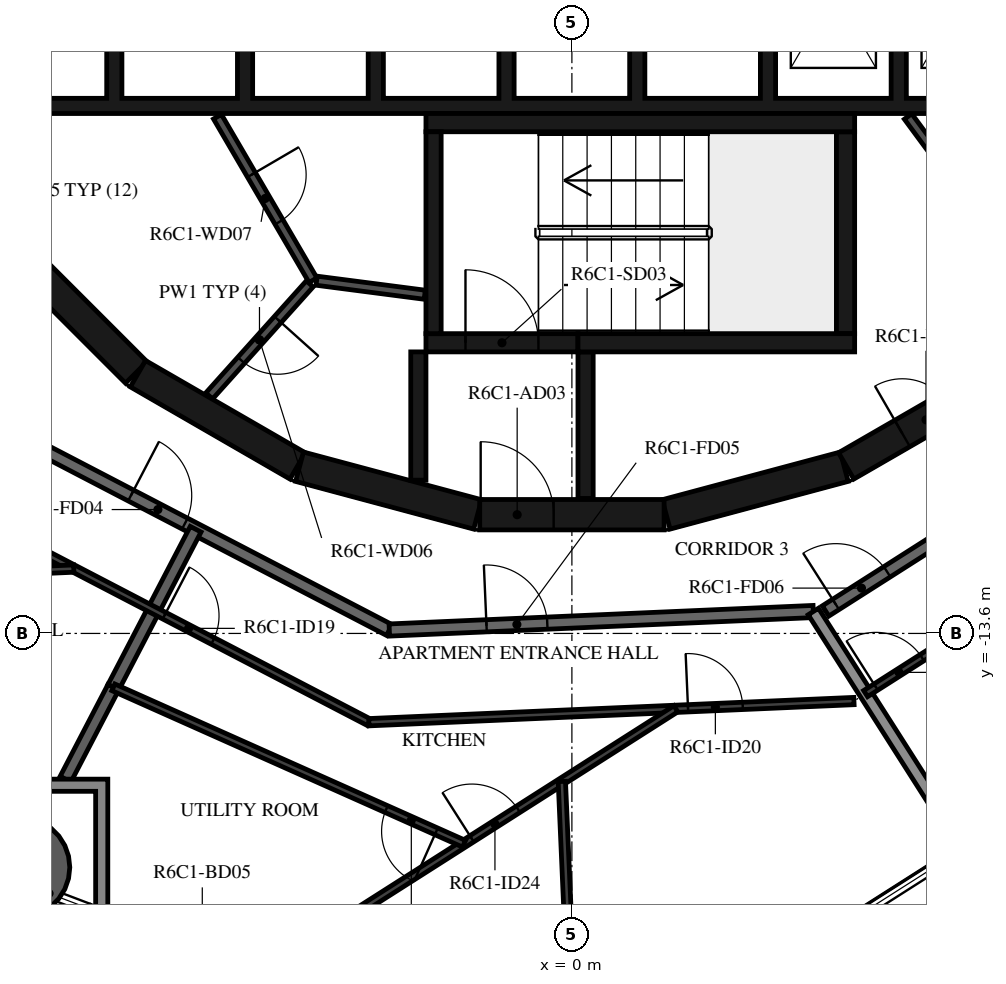
"""IFC4 building model, lengths in metres.
Left out: names, types, materials, properties, quantities, classifications, styles, units other than length and angle.
Written with IfcOpenShell. Run it as: python <this file> out.ifc"""

import sys

from ifc_helpers import new_model, si_unit, direction, frame, frame_2d, origin, origin_2d, place, context, subcontext, project, spatial, polyline, rectangle, hollow_circle, outline, extrude, element, fill, save


model = new_model("IFC4")
c1 = context("Model", 3, precision=1e-05, world=origin(), true_north=direction((0.0, 1.0)))
c2 = subcontext(c1, "Body", "Model", "MODEL_VIEW")
j1 = project(units=[si_unit("LENGTHUNIT", "METRE"), si_unit("PLANEANGLEUNIT", "RADIAN")], contexts=[c1])
p1 = place(None, origin())
s1 = spatial("IfcSite", under=j1, at=p1, CompositionType="ELEMENT")
p2 = place(p1, origin())
s2 = spatial("IfcBuilding", under=s1, at=p2, CompositionType="ELEMENT")
p3 = place(p2, frame((0.0, 0.0, 251.2)))
s3 = spatial("IfcBuildingStorey", under=s2, at=p3, CompositionType="ELEMENT", Elevation=251.2)
p4 = place(p3, frame((-9.082, -17.446, -0.38), z_axis=(0.0, 0.0, 1.0), x_axis=(1.0, 0.0, 0.0)))
e1 = element("IfcColumn", 1, at=p4, inside=s3, PredefinedType="COLUMN", context=c2, shape_type="SweptSolid", body=[
    extrude(hollow_circle(Radius=0.825, WallThickness=0.04, at=origin_2d()), origin(), (0.0, 0.0, 1.0), 3.5),
])
p5 = place(p3, frame((1.55, -11.643, 0.0), z_axis=(0.0, 0.0, 1.0), x_axis=(0.965948410781, 0.258734743916, 0.0)))
e2 = element("IfcWall", 2, at=p5, inside=s3, PredefinedType="SHEAR", context=c2, shape_type="SweptSolid", body=[
    extrude(rectangle(XDim=3.033, YDim=0.5, at=frame_2d((1.516, 0.0))), origin(), (0.0, 0.0, 1.0), 3.12),
])
p6 = place(p3, frame((4.51, -10.845, 0.0), z_axis=(0.0, 0.0, 1.0), x_axis=(0.865975092491, 0.500087131594, 0.0)))
e3 = element("IfcWall", 3, at=p6, inside=s3, PredefinedType="SHEAR", context=c2, shape_type="SweptSolid", body=[
    extrude(rectangle(XDim=3.033, YDim=0.5, at=frame_2d((1.516, 0.0))), origin(), (0.0, 0.0, 1.0), 3.12),
])
p7 = place(p6, frame((1.066, 0.0, 0.0)))
e4 = element("IfcOpeningElement", 4, at=p7, cuts=e3, PredefinedType="OPENING", context=c2, shape_type="SweptSolid", body=[
    extrude(rectangle(XDim=0.9, YDim=2.1, at=frame_2d((0.45, 1.05))), frame((0.0, 0.26, 0.0), z_axis=(0.0, -1.0, 0.0), x_axis=(1.0, 0.0, 0.0)), (0.0, 0.0, 1.0), 0.52),
])
p8 = place(p3, frame((-9.308, -7.164, 0.0), z_axis=(0.0, 0.0, 1.0), x_axis=(0.707106781187, -0.707106781187, 0.0)))
e5 = element("IfcWall", 5, at=p8, inside=s3, PredefinedType="SHEAR", context=c2, shape_type="SweptSolid", body=[
    extrude(rectangle(XDim=3.032, YDim=0.5, at=frame_2d((1.516, 0.0))), origin(), (0.0, 0.0, 1.0), 3.12),
])
for number, where, z_axis, x_axis in (
    (6, (-7.137, -9.329, 0.0), (0.0, 0.0, 1.0), (0.866, -0.5, 0.0)),
    (7, (-4.479, -10.858, 0.0), (0.0, 0.0, 1.0), (0.966, -0.259, 0.0)),
):
    element("IfcWall", number, at=place(p3, frame(where, z_axis=z_axis, x_axis=x_axis)), inside=s3, PredefinedType="SHEAR", context=c2, shape_type="SweptSolid", body=[
        extrude(rectangle(XDim=3.033, YDim=0.5, at=frame_2d((1.516, 0.0))), origin(), (0.0, 0.0, 1.0), 3.12),
    ])
p9 = place(p3, frame((-1.516, -11.647, 0.0), z_axis=(0.0, 0.0, 1.0), x_axis=(1.0, 0.0, 0.0)))
e8 = element("IfcWall", 8, at=p9, inside=s3, PredefinedType="SHEAR", context=c2, shape_type="SweptSolid", body=[
    extrude(rectangle(XDim=3.033, YDim=0.5, at=frame_2d((1.516, 0.0))), origin(), (0.0, 0.0, 1.0), 3.12),
])
p10 = place(p9, frame((0.016, 0.0, 0.0)))
e9 = element("IfcOpeningElement", 9, at=p10, cuts=e8, PredefinedType="OPENING", context=c2, shape_type="SweptSolid", body=[
    extrude(rectangle(XDim=1.2, YDim=2.1, at=frame_2d((0.6, 1.05))), frame((0.0, 0.26, 0.0), z_axis=(0.0, -1.0, 0.0), x_axis=(1.0, 0.0, 0.0)), (0.0, 0.0, 1.0), 0.52),
])
p11 = place(p3, frame((-2.275, -8.67, 0.0), z_axis=(0.0, 0.0, 1.0), x_axis=(0.0, 1.0, 0.0)))
e10 = element("IfcWall", 10, at=p11, inside=s3, PredefinedType="SHEAR", context=c2, shape_type="SweptSolid", body=[
    extrude(rectangle(XDim=3.32, YDim=0.25, at=frame_2d((1.66, 0.0))), origin(), (0.0, 0.0, 1.0), 3.12),
])
p12 = place(p3, frame((-2.4, -5.2, 0.0), z_axis=(0.0, 0.0, 1.0), x_axis=(1.0, 0.0, 0.0)))
e11 = element("IfcWall", 11, at=p12, inside=s3, PredefinedType="SHEAR", context=c2, shape_type="SweptSolid", body=[
    extrude(rectangle(XDim=7.05, YDim=0.3, at=frame_2d((3.525, 0.0))), origin(), (0.0, 0.0, 1.0), 3.12),
])
p13 = place(p3, frame((4.5, -8.67, 0.0), z_axis=(0.0, 0.0, 1.0), x_axis=(0.0, 1.0, 0.0)))
e12 = element("IfcWall", 12, at=p13, inside=s3, PredefinedType="SHEAR", context=c2, shape_type="SweptSolid", body=[
    extrude(rectangle(XDim=3.32, YDim=0.3, at=frame_2d((1.66, 0.0))), origin(), (0.0, 0.0, 1.0), 3.12),
])
p14 = place(p3, frame((0.1, -8.82, 0.0), z_axis=(0.0, 0.0, 1.0), x_axis=(1.0, 0.0, 0.0)))
e13 = element("IfcWall", 13, at=p14, inside=s3, PredefinedType="SHEAR", context=c2, shape_type="SweptSolid", body=[
    extrude(rectangle(XDim=4.55, YDim=0.3, at=frame_2d((2.275, 0.0))), origin(), (0.0, 0.0, 1.0), 3.12),
])
p15 = place(p3, frame((-2.4, -8.82, 0.0), z_axis=(0.0, 0.0, 1.0), x_axis=(1.0, 0.0, 0.0)))
e14 = element("IfcWall", 14, at=p15, inside=s3, PredefinedType="SHEAR", context=c2, shape_type="SweptSolid", body=[
    extrude(rectangle(XDim=2.5, YDim=0.3, at=frame_2d((1.25, 0.0))), origin(), (0.0, 0.0, 1.0), 3.12),
])
p16 = place(p15, frame((0.65, 0.0, 0.0)))
e15 = element("IfcOpeningElement", 15, at=p16, cuts=e14, PredefinedType="OPENING", context=c2, shape_type="SweptSolid", body=[
    extrude(rectangle(XDim=1.2, YDim=2.1, at=frame_2d((0.6, 1.05))), frame((0.0, 0.16, 0.0), z_axis=(0.0, -1.0, 0.0), x_axis=(1.0, 0.0, 0.0)), (0.0, 0.0, 1.0), 0.32),
])
p17 = place(p3, frame((-2.525, -8.97, 0.0), z_axis=(0.0, 0.0, 1.0), x_axis=(0.0, -1.0, 0.0)))
e16 = element("IfcWall", 16, at=p17, inside=s3, PredefinedType="SHEAR", context=c2, shape_type="SweptSolid", body=[
    extrude(rectangle(XDim=2.11, YDim=0.25, at=frame_2d((1.055, 0.0))), origin(), (0.0, 0.0, 1.0), 3.12),
])
p18 = place(p3, frame((0.225, -8.97, 0.0), z_axis=(0.0, 0.0, 1.0), x_axis=(0.0, -1.0, 0.0)))
e17 = element("IfcWall", 17, at=p18, inside=s3, PredefinedType="SHEAR", context=c2, shape_type="SweptSolid", body=[
    extrude(rectangle(XDim=2.41, YDim=0.25, at=frame_2d((1.205, 0.0))), origin(), (0.0, 0.0, 1.0), 3.12),
])
p19 = place(p3, origin())
e18 = element("IfcWall", 18, at=p19, inside=s3, PredefinedType="SHEAR", context=c2, shape_type="SweptSolid", body=[
    extrude(outline(polyline([(9.8, -5.05), (9.8, -4.8), (9.8, -1.9), (9.55, -1.9), (9.55, -4.8), (7.65, -4.8), (7.65, -1.9), (7.4, -1.9), (7.4, -4.8), (5.5, -4.8), (5.5, -1.9), (5.25, -1.9), (5.25, -4.8), (3.35, -4.8), (3.35, -1.9), (3.1, -1.9), (3.1, -4.8), (1.2, -4.8), (1.2, -1.9), (0.95, -1.9), (0.95, -4.8), (-0.95, -4.8), (-0.95, -1.9), (-1.2, -1.9), (-1.2, -4.8), (-3.1, -4.8), (-3.1, -1.9), (-3.35, -1.9), (-3.35, -4.8), (-5.25, -4.8), (-5.25, -1.9), (-5.5, -1.9), (-5.5, -4.8), (-7.4, -4.8), (-7.4, -1.9), (-7.65, -1.9), (-7.65, -4.8), (-9.55, -4.8), (-9.55, -1.9), (-9.8, -1.9), (-9.8, -4.8), (-9.8, -5.05), (9.8, -5.05)])), origin(), (0.0, 0.0, 1.0), 3.12),
])
p20 = place(p3, frame((5.528, -5.098, 0.0), z_axis=(0.0, 0.0, 1.0), x_axis=(0.594034318069, -0.804439698769, 0.0)))
e19 = element("IfcWall", 19, at=p20, inside=s3, PredefinedType="PARTITIONING", context=c2, shape_type="SweptSolid", body=[
    extrude(rectangle(XDim=3.907, YDim=0.15, at=frame_2d((1.953, 0.0))), origin(), (0.0, 0.0, 1.0), 3.12),
])
p21 = place(p3, frame((-5.829, -5.102, 0.0), z_axis=(0.0, 0.0, 1.0), x_axis=(0.504480008384, -0.863423373057, 0.0)))
e20 = element("IfcWall", 20, at=p21, inside=s3, PredefinedType="PARTITIONING", context=c2, shape_type="SweptSolid", body=[
    extrude(rectangle(XDim=3.115, YDim=0.15, at=frame_2d((1.558, 0.0))), origin(), (0.0, 0.0, 1.0), 3.12),
])
p22 = place(p21, frame((1.107, 0.0, 0.0)))
e21 = element("IfcOpeningElement", 21, at=p22, cuts=e20, PredefinedType="OPENING", context=c2, shape_type="SweptSolid", body=[
    extrude(rectangle(XDim=0.9, YDim=2.1, at=frame_2d((0.45, 1.05))), frame((0.0, 0.085, 0.0), z_axis=(0.0, -1.0, 0.0), x_axis=(1.0, 0.0, 0.0)), (0.0, 0.0, 1.0), 0.17),
])
p23 = place(p3, frame((-4.311, -7.851, 0.0), z_axis=(0.0, 0.0, 1.0), x_axis=(-0.667869133096, -0.744278725383, 0.0)))
e22 = element("IfcWall", 22, at=p23, inside=s3, PredefinedType="PARTITIONING", context=c2, shape_type="SweptSolid", body=[
    extrude(rectangle(XDim=2.476, YDim=0.15, at=frame_2d((1.238, 0.0))), origin(), (0.0, 0.0, 1.0), 3.12),
])
p24 = place(p23, frame((0.788, 0.0, 0.0)))
e23 = element("IfcOpeningElement", 23, at=p24, cuts=e22, PredefinedType="OPENING", context=c2, shape_type="SweptSolid", body=[
    extrude(rectangle(XDim=0.9, YDim=2.1, at=frame_2d((0.45, 1.05))), frame((0.0, 0.085, 0.0), z_axis=(0.0, -1.0, 0.0), x_axis=(1.0, 0.0, 0.0)), (0.0, 0.0, 1.0), 0.17),
])
p25 = place(p3, frame((-4.198, -7.799, 0.0), z_axis=(0.0, 0.0, 1.0), x_axis=(0.991686747293, -0.128675542523, 0.0)))
e24 = element("IfcWall", 24, at=p25, inside=s3, PredefinedType="PARTITIONING", context=c2, shape_type="SweptSolid", body=[
    extrude(rectangle(XDim=1.793, YDim=0.15, at=frame_2d((0.896, 0.0))), origin(), (0.0, 0.0, 1.0), 3.12),
])
p26 = place(p3, frame((-9.372, -10.228, 0.0), z_axis=(0.0, 0.0, 1.0), x_axis=(0.887005184532, -0.461759464021, 0.0)))
e25 = element("IfcWall", 25, at=p26, inside=s3, PredefinedType="STANDARD", context=c2, shape_type="SweptSolid", body=[
    extrude(rectangle(XDim=7.181, YDim=0.2, at=frame_2d((3.591, 0.0))), origin(), (0.0, 0.0, 1.0), 3.12),
])
p27 = place(p26, frame((2.391, 0.0, 0.0)))
e26 = element("IfcOpeningElement", 26, at=p27, cuts=e25, PredefinedType="OPENING", context=c2, shape_type="SweptSolid", body=[
    extrude(rectangle(XDim=1.0, YDim=2.1, at=frame_2d((0.5, 1.05))), frame((0.0, 0.11, 0.0), z_axis=(0.0, -1.0, 0.0), x_axis=(1.0, 0.0, 0.0)), (0.0, 0.0, 1.0), 0.22),
])
p28 = place(p3, frame((-3.003, -13.544, 0.0), z_axis=(0.0, 0.0, 1.0), x_axis=(0.999048221872, 0.043619380718, 0.0)))
e27 = element("IfcWall", 27, at=p28, inside=s3, PredefinedType="STANDARD", context=c2, shape_type="SweptSolid", body=[
    extrude(rectangle(XDim=6.979, YDim=0.2, at=frame_2d((3.49, 0.0))), origin(), (0.0, 0.0, 1.0), 3.12),
])
p29 = place(p28, frame((1.6, 0.0, 0.0)))
e28 = element("IfcOpeningElement", 28, at=p29, cuts=e27, PredefinedType="OPENING", context=c2, shape_type="SweptSolid", body=[
    extrude(rectangle(XDim=1.0, YDim=2.1, at=frame_2d((0.5, 1.05))), frame((0.0, 0.11, 0.0), z_axis=(0.0, -1.0, 0.0), x_axis=(1.0, 0.0, 0.0)), (0.0, 0.0, 1.0), 0.22),
])
p30 = place(p3, frame((4.172, -13.231, 0.0), z_axis=(0.0, 0.0, 1.0), x_axis=(0.843388394728, 0.537304397561, 0.0)))
e29 = element("IfcWall", 29, at=p30, inside=s3, PredefinedType="STANDARD", context=c2, shape_type="SweptSolid", body=[
    extrude(rectangle(XDim=7.181, YDim=0.2, at=frame_2d((3.59, 0.0))), origin(), (0.0, 0.0, 1.0), 3.12),
])
p31 = place(p30, frame((0.2, 0.0, 0.0)))
e30 = element("IfcOpeningElement", 30, at=p31, cuts=e29, PredefinedType="OPENING", context=c2, shape_type="SweptSolid", body=[
    extrude(rectangle(XDim=1.0, YDim=2.1, at=frame_2d((0.5, 1.05))), frame((0.0, 0.11, 0.0), z_axis=(0.0, -1.0, 0.0), x_axis=(1.0, 0.0, 0.0)), (0.0, 0.0, 1.0), 0.22),
])
p32 = place(p3, frame((-7.541, -14.486, 0.0), z_axis=(0.0, 0.0, 1.0), x_axis=(0.461746051786, 0.88701216658, 0.0)))
e31 = element("IfcWall", 31, at=p32, inside=s3, PredefinedType="STANDARD", context=c2, shape_type="SweptSolid", body=[
    extrude(rectangle(XDim=2.931, YDim=0.2, at=frame_2d((1.466, 0.0))), origin(), (0.0, 0.0, 1.0), 3.12),
])
p33 = place(p3, frame((-8.327, -15.996, 0.0), z_axis=(0.0, 0.0, 1.0), x_axis=(0.461722915657, 0.887024210017, 0.0)))
e32 = element("IfcWall", 32, at=p33, inside=s3, PredefinedType="STANDARD", context=c2, shape_type="SweptSolid", body=[
    extrude(rectangle(XDim=1.703, YDim=0.2, at=frame_2d((0.851, 0.0))), origin(), (0.0, 0.0, 1.0), 3.12),
])
p34 = place(p3, frame((6.407, -17.064, 0.0), z_axis=(0.0, 0.0, 1.0), x_axis=(-0.537324777979, 0.843375410461, 0.0)))
e33 = element("IfcWall", 33, at=p34, inside=s3, PredefinedType="STANDARD", context=c2, shape_type="SweptSolid", body=[
    extrude(rectangle(XDim=4.535, YDim=0.2, at=frame_2d((2.268, 0.0))), origin(), (0.0, 0.0, 1.0), 2.73),
])
p35 = place(p3, frame((-10.421, -11.373, 0.0), z_axis=(0.0, 0.0, 1.0), x_axis=(0.887012970857, -0.461744506769, 0.0)))
e34 = element("IfcWall", 34, at=p35, inside=s3, PredefinedType="PARTITIONING", context=c2, shape_type="SweptSolid", body=[
    extrude(rectangle(XDim=7.985, YDim=0.12, at=frame_2d((3.992, 0.0))), origin(), (0.0, 0.0, 1.0), 3.12),
])
p36 = place(p35, frame((4.192, 0.0, 0.0)))
e35 = element("IfcOpeningElement", 35, at=p36, cuts=e34, PredefinedType="OPENING", context=c2, shape_type="SweptSolid", body=[
    extrude(rectangle(XDim=0.9, YDim=2.1, at=frame_2d((0.45, 1.05))), frame((0.0, 0.07, 0.0), z_axis=(0.0, -1.0, 0.0), x_axis=(1.0, 0.0, 0.0)), (0.0, 0.0, 1.0), 0.14),
])
p37 = place(p3, frame((-13.69, -12.774, 0.0), z_axis=(0.0, 0.0, 1.0), x_axis=(0.999048778431, 0.043606631553, 0.0)))
e36 = element("IfcWall", 36, at=p37, inside=s3, PredefinedType="PARTITIONING", context=c2, shape_type="SweptSolid", body=[
    extrude(rectangle(XDim=5.503, YDim=0.12, at=frame_2d((2.752, 0.0))), origin(), (0.0, 0.0, 1.0), 3.12),
])
p38 = place(p37, frame((0.6, 0.0, 0.0)))
e37 = element("IfcOpeningElement", 37, at=p38, cuts=e36, PredefinedType="OPENING", context=c2, shape_type="SweptSolid", body=[
    extrude(rectangle(XDim=0.9, YDim=2.1, at=frame_2d((0.45, 1.05))), frame((0.0, 0.07, 0.0), z_axis=(0.0, -1.0, 0.0), x_axis=(1.0, 0.0, 0.0)), (0.0, 0.0, 1.0), 0.14),
])
p39 = place(p3, frame((-3.339, -15.06, 0.0), z_axis=(0.0, 0.0, 1.0), x_axis=(0.999047716945, 0.043630943905, 0.0)))
e38 = element("IfcWall", 38, at=p39, inside=s3, PredefinedType="PARTITIONING", context=c2, shape_type="SweptSolid", body=[
    extrude(rectangle(XDim=7.985, YDim=0.12, at=frame_2d((3.992, 0.0))), origin(), (0.0, 0.0, 1.0), 3.12),
])
p40 = place(p39, frame((5.253, 0.0, 0.0)))
e39 = element("IfcOpeningElement", 39, at=p40, cuts=e38, PredefinedType="OPENING", context=c2, shape_type="SweptSolid", body=[
    extrude(rectangle(XDim=0.9, YDim=2.1, at=frame_2d((0.45, 1.05))), frame((0.0, 0.07, 0.0), z_axis=(0.0, -1.0, 0.0), x_axis=(1.0, 0.0, 0.0)), (0.0, 0.0, 1.0), 0.14),
])
p41 = place(p3, frame((-6.932, -20.345, 0.0), z_axis=(0.0, 0.0, 1.0), x_axis=(0.843388627156, 0.537304032726, 0.0)))
e40 = element("IfcWall", 40, at=p41, inside=s3, PredefinedType="PARTITIONING", context=c2, shape_type="SweptSolid", body=[
    extrude(rectangle(XDim=10.246, YDim=0.12, at=frame_2d((5.123, 0.0))), origin(), (0.0, 0.0, 1.0), 3.12),
])
p42 = place(p41, frame((2.138, 0.0, 0.0)))
e41 = element("IfcOpeningElement", 41, at=p42, cuts=e40, PredefinedType="OPENING", context=c2, shape_type="SweptSolid", body=[
    extrude(rectangle(XDim=0.9, YDim=2.1, at=frame_2d((0.45, 1.05))), frame((0.0, 0.07, 0.0), z_axis=(0.0, -1.0, 0.0), x_axis=(1.0, 0.0, 0.0)), (0.0, 0.0, 1.0), 0.14),
])
p43 = place(p41, frame((6.268, 0.0, 0.0)))
e42 = element("IfcOpeningElement", 42, at=p43, cuts=e40, PredefinedType="OPENING", context=c2, shape_type="SweptSolid", body=[
    extrude(rectangle(XDim=0.9, YDim=2.1, at=frame_2d((0.45, 1.05))), frame((0.0, 0.07, 0.0), z_axis=(0.0, -1.0, 0.0), x_axis=(1.0, 0.0, 0.0)), (0.0, 0.0, 1.0), 0.14),
])
p44 = place(p3, frame((-1.773, -17.059, 0.0), z_axis=(0.0, 0.0, 1.0), x_axis=(-0.913279926902, 0.407332511736, 0.0)))
e43 = element("IfcWall", 43, at=p44, inside=s3, PredefinedType="PARTITIONING", context=c2, shape_type="SweptSolid", body=[
    extrude(rectangle(XDim=6.315, YDim=0.12, at=frame_2d((3.158, 0.0))), origin(), (0.0, 0.0, 1.0), 3.12),
])
p45 = place(p44, frame((0.5, 0.0, 0.0)))
e44 = element("IfcOpeningElement", 44, at=p45, cuts=e43, PredefinedType="OPENING", context=c2, shape_type="SweptSolid", body=[
    extrude(rectangle(XDim=0.9, YDim=2.1, at=frame_2d((0.45, 1.05))), frame((0.0, 0.07, 0.0), z_axis=(0.0, -1.0, 0.0), x_axis=(1.0, 0.0, 0.0)), (0.0, 0.0, 1.0), 0.14),
])
p46 = place(p3, frame((0.056, -21.11, 0.0), z_axis=(0.0, 0.0, 1.0), x_axis=(-0.043583193193, 0.999049801197, 0.0)))
e45 = element("IfcWall", 45, at=p46, inside=s3, PredefinedType="PARTITIONING", context=c2, shape_type="SweptSolid", body=[
    extrude(rectangle(XDim=5.081, YDim=0.12, at=frame_2d((2.541, 0.0))), origin(), (0.0, 0.0, 1.0), 3.12),
])
p47 = place(p3, frame((4.83, -14.59, 0.0), z_axis=(0.0, 0.0, 1.0), x_axis=(0.843393042763, 0.537297101629, 0.0)))
e46 = element("IfcWall", 46, at=p47, inside=s3, PredefinedType="PARTITIONING", context=c2, shape_type="SweptSolid", body=[
    extrude(rectangle(XDim=7.53, YDim=0.12, at=frame_2d((3.765, 0.0))), origin(), (0.0, 0.0, 1.0), 3.12),
])
p48 = place(p47, frame((0.2, 0.0, 0.0)))
e47 = element("IfcOpeningElement", 47, at=p48, cuts=e46, PredefinedType="OPENING", context=c2, shape_type="SweptSolid", body=[
    extrude(rectangle(XDim=0.9, YDim=2.1, at=frame_2d((0.45, 1.05))), frame((0.0, 0.07, 0.0), z_axis=(0.0, -1.0, 0.0), x_axis=(1.0, 0.0, 0.0)), (0.0, 0.0, 1.0), 0.14),
])
p49 = place(p3, origin())
e48 = element("IfcWall", 48, at=p49, inside=s3, PredefinedType="STANDARD", context=c2, shape_type="SweptSolid", body=[
    extrude(outline(polyline([(-7.632, -15.996), (-7.632, -18.896), (-10.532, -18.896), (-10.532, -15.996), (-7.632, -15.996)]), holes=[polyline([(-10.332, -18.696), (-7.832, -18.696), (-7.832, -16.196), (-10.332, -16.196), (-10.332, -18.696)])]), origin(), (0.0, 0.0, 1.0), 3.12),
])
p50 = place(p16, origin())
e49 = element("IfcDoor", 49, at=p50, inside=s3, OperationType="SINGLE_SWING_LEFT", PredefinedType="DOOR", context=c2, shape_type="SweptSolid", body=[
    extrude(rectangle(XDim=1.2, YDim=2.1, at=frame_2d((0.6, 1.05))), frame((0.0, 0.025, 0.0), z_axis=(0.0, -1.0, 0.0), x_axis=(1.0, 0.0, 0.0)), (0.0, 0.0, 1.0), 0.05),
])
fill(e15, e49)
p51 = place(p10, origin())
e50 = element("IfcDoor", 50, at=p51, inside=s3, OperationType="SINGLE_SWING_RIGHT", PredefinedType="DOOR", context=c2, shape_type="SweptSolid", body=[
    extrude(rectangle(XDim=1.2, YDim=2.1, at=frame_2d((0.6, 1.05))), frame((0.0, 0.025, 0.0), z_axis=(0.0, -1.0, 0.0), x_axis=(1.0, 0.0, 0.0)), (0.0, 0.0, 1.0), 0.05),
])
fill(e9, e50)
p52 = place(p24, origin())
e51 = element("IfcDoor", 51, at=p52, inside=s3, OperationType="SINGLE_SWING_RIGHT", PredefinedType="DOOR", context=c2, shape_type="SweptSolid", body=[
    extrude(rectangle(XDim=0.9, YDim=2.1, at=frame_2d((0.45, 1.05))), frame((0.0, 0.025, 0.0), z_axis=(0.0, -1.0, 0.0), x_axis=(1.0, 0.0, 0.0)), (0.0, 0.0, 1.0), 0.05),
])
fill(e23, e51)
p53 = place(p22, origin())
e52 = element("IfcDoor", 52, at=p53, inside=s3, OperationType="SINGLE_SWING_LEFT", PredefinedType="DOOR", context=c2, shape_type="SweptSolid", body=[
    extrude(rectangle(XDim=0.9, YDim=2.1, at=frame_2d((0.45, 1.05))), frame((0.0, 0.025, 0.0), z_axis=(0.0, -1.0, 0.0), x_axis=(1.0, 0.0, 0.0)), (0.0, 0.0, 1.0), 0.05),
])
fill(e21, e52)
p54 = place(p7, origin())
e53 = element("IfcDoor", 53, at=p54, inside=s3, OperationType="SINGLE_SWING_RIGHT", PredefinedType="DOOR", context=c2, shape_type="SweptSolid", body=[
    extrude(rectangle(XDim=0.9, YDim=2.1, at=frame_2d((0.45, 1.05))), frame((0.0, 0.025, 0.0), z_axis=(0.0, -1.0, 0.0), x_axis=(1.0, 0.0, 0.0)), (0.0, 0.0, 1.0), 0.05),
])
fill(e4, e53)
p55 = place(p27, origin())
e54 = element("IfcDoor", 54, at=p55, inside=s3, OperationType="SINGLE_SWING_RIGHT", PredefinedType="DOOR", context=c2, shape_type="SweptSolid", body=[
    extrude(rectangle(XDim=1.0, YDim=2.1, at=frame_2d((0.5, 1.05))), frame((0.0, 0.025, 0.0), z_axis=(0.0, -1.0, 0.0), x_axis=(1.0, 0.0, 0.0)), (0.0, 0.0, 1.0), 0.05),
])
fill(e26, e54)
p56 = place(p29, origin())
e55 = element("IfcDoor", 55, at=p56, inside=s3, OperationType="SINGLE_SWING_LEFT", PredefinedType="DOOR", context=c2, shape_type="SweptSolid", body=[
    extrude(rectangle(XDim=1.0, YDim=2.1, at=frame_2d((0.5, 1.05))), frame((0.0, 0.025, 0.0), z_axis=(0.0, -1.0, 0.0), x_axis=(1.0, 0.0, 0.0)), (0.0, 0.0, 1.0), 0.05),
])
fill(e28, e55)
p57 = place(p36, origin())
e56 = element("IfcDoor", 56, at=p57, inside=s3, OperationType="SINGLE_SWING_LEFT", PredefinedType="DOOR", context=c2, shape_type="SweptSolid", body=[
    extrude(rectangle(XDim=0.9, YDim=2.1, at=frame_2d((0.45, 1.05))), frame((0.0, 0.025, 0.0), z_axis=(0.0, -1.0, 0.0), x_axis=(1.0, 0.0, 0.0)), (0.0, 0.0, 1.0), 0.05),
])
fill(e35, e56)
p58 = place(p40, origin())
e57 = element("IfcDoor", 57, at=p58, inside=s3, OperationType="SINGLE_SWING_LEFT", PredefinedType="DOOR", context=c2, shape_type="SweptSolid", body=[
    extrude(rectangle(XDim=0.9, YDim=2.1, at=frame_2d((0.45, 1.05))), frame((0.0, 0.025, 0.0), z_axis=(0.0, -1.0, 0.0), x_axis=(1.0, 0.0, 0.0)), (0.0, 0.0, 1.0), 0.05),
])
fill(e39, e57)
p59 = place(p45, origin())
e58 = element("IfcDoor", 58, at=p59, inside=s3, OperationType="SINGLE_SWING_LEFT", PredefinedType="DOOR", context=c2, shape_type="SweptSolid", body=[
    extrude(rectangle(XDim=0.9, YDim=2.1, at=frame_2d((0.45, 1.05))), frame((0.0, 0.025, 0.0), z_axis=(0.0, -1.0, 0.0), x_axis=(1.0, 0.0, 0.0)), (0.0, 0.0, 1.0), 0.05),
])
fill(e44, e58)
p60 = place(p43, origin())
e59 = element("IfcDoor", 59, at=p60, inside=s3, OperationType="SINGLE_SWING_RIGHT", PredefinedType="DOOR", context=c2, shape_type="SweptSolid", body=[
    extrude(rectangle(XDim=0.9, YDim=2.1, at=frame_2d((0.45, 1.05))), frame((0.0, 0.025, 0.0), z_axis=(0.0, -1.0, 0.0), x_axis=(1.0, 0.0, 0.0)), (0.0, 0.0, 1.0), 0.05),
])
fill(e42, e59)
p61 = place(p31, origin())
e60 = element("IfcDoor", 60, at=p61, inside=s3, OperationType="SINGLE_SWING_LEFT", PredefinedType="DOOR", context=c2, shape_type="SweptSolid", body=[
    extrude(rectangle(XDim=1.0, YDim=2.1, at=frame_2d((0.5, 1.05))), frame((0.0, 0.025, 0.0), z_axis=(0.0, -1.0, 0.0), x_axis=(1.0, 0.0, 0.0)), (0.0, 0.0, 1.0), 0.05),
])
fill(e30, e60)
p62 = place(p48, origin())
e61 = element("IfcDoor", 61, at=p62, inside=s3, OperationType="SINGLE_SWING_LEFT", PredefinedType="DOOR", context=c2, shape_type="SweptSolid", body=[
    extrude(rectangle(XDim=0.9, YDim=2.1, at=frame_2d((0.45, 1.05))), frame((0.0, 0.025, 0.0), z_axis=(0.0, -1.0, 0.0), x_axis=(1.0, 0.0, 0.0)), (0.0, 0.0, 1.0), 0.05),
])
fill(e47, e61)
save(model, sys.argv[1])
